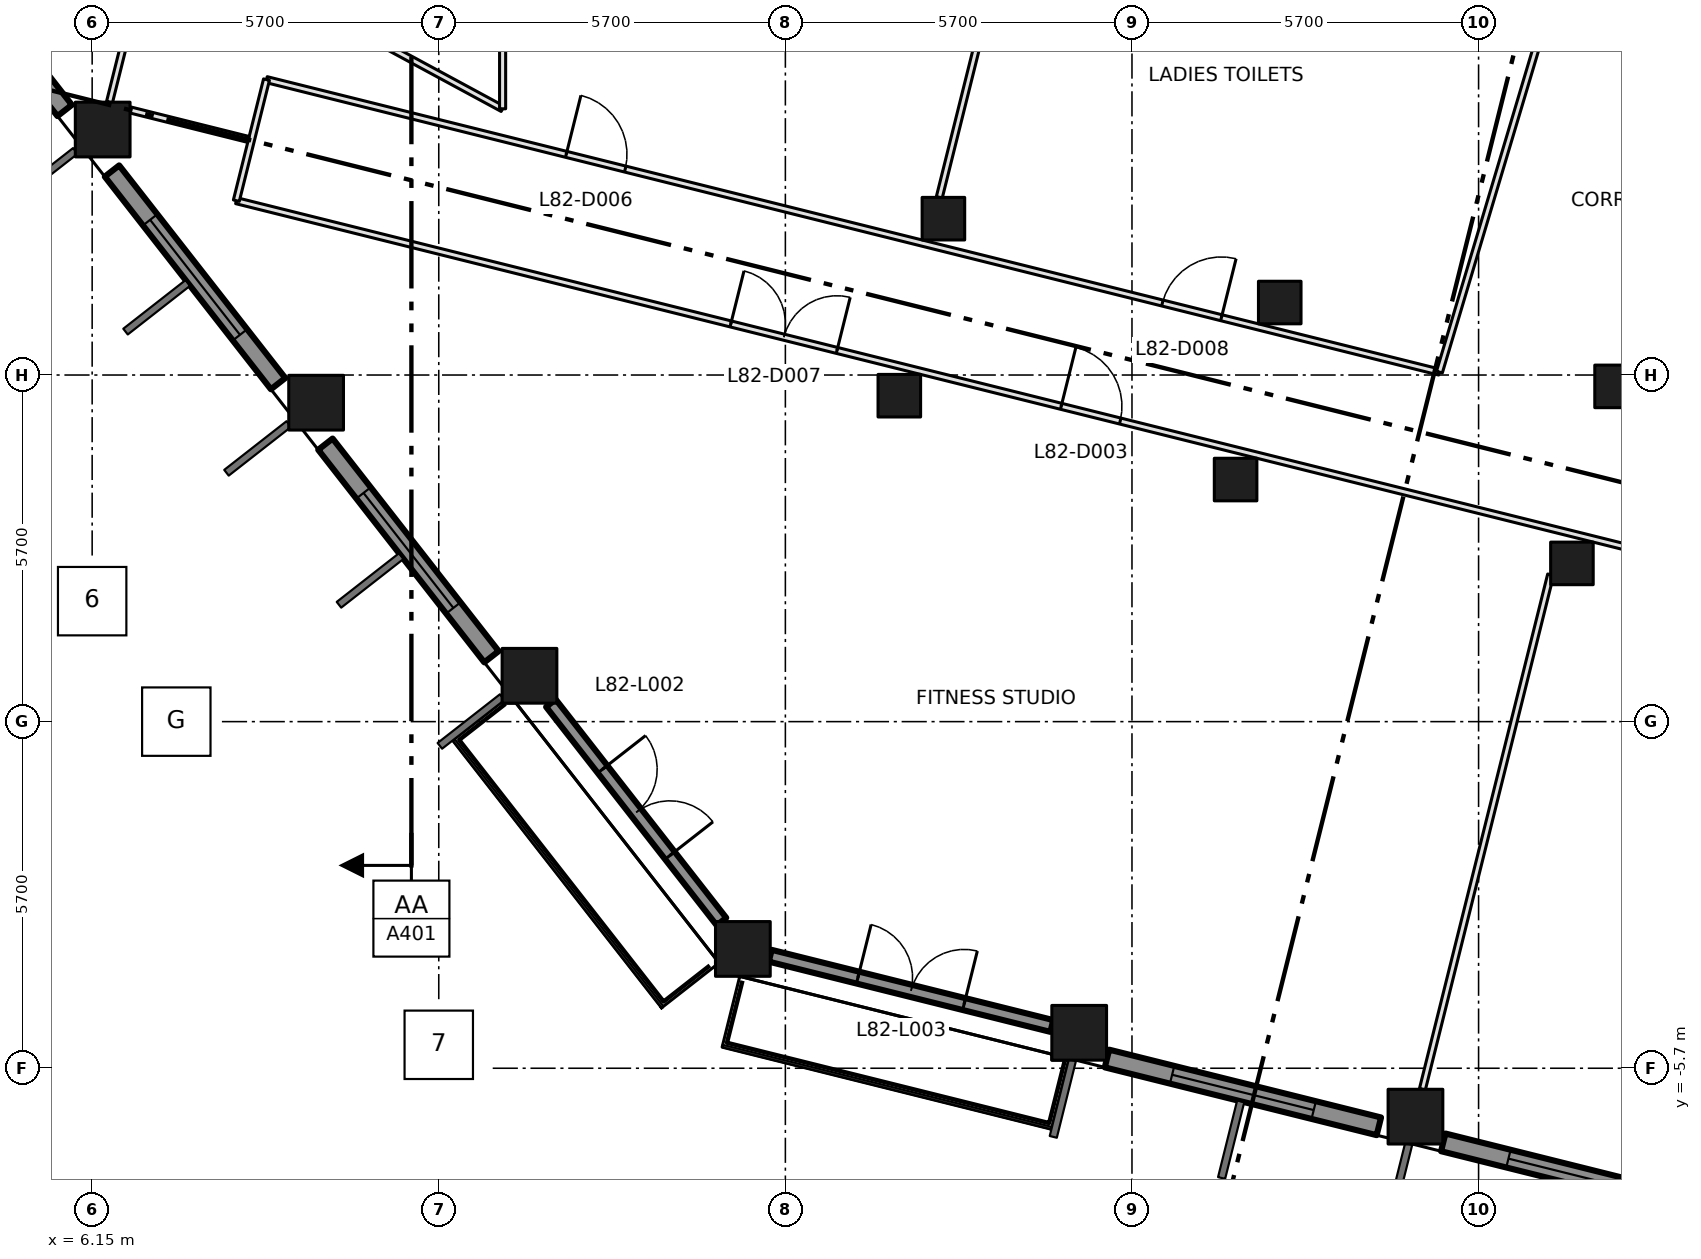
"""IFC4 building model, lengths in metres.
Left out: names, types, materials, properties, quantities, classifications, styles, units other than length and angle.
Written with IfcOpenShell. Run it as: python <this file> out.ifc"""

import sys

from ifc_helpers import new_model, si_unit, direction, frame, frame_2d, origin, origin_2d, place, context, subcontext, project, spatial, rectangle, extrude, element, fill, save


model = new_model("IFC4")
c1 = context("Model", 3, precision=1e-05, world=origin(), true_north=direction((0.0, 1.0)))
c2 = subcontext(c1, "Body", "Model", "MODEL_VIEW")
j1 = project(units=[si_unit("LENGTHUNIT", "METRE"), si_unit("PLANEANGLEUNIT", "RADIAN")], contexts=[c1])
p1 = place(None, origin())
s1 = spatial("IfcSite", under=j1, at=p1, CompositionType="ELEMENT")
p2 = place(p1, origin())
s2 = spatial("IfcBuilding", under=s1, at=p2, CompositionType="ELEMENT")
p3 = place(p2, frame((0.0, 0.0, 358.2)))
s3 = spatial("IfcBuildingStorey", under=s2, at=p3, CompositionType="ELEMENT", Elevation=358.2)
for number, where, z_axis, x_axis in (
    (1, (16.851, -3.738, 0.0), (0.0, 0.0, 1.0), (1.0, 0.0, 0.0)),
    (2, (13.342, 0.754, 0.0), (0.0, 0.0, 1.0), (1.0, 0.0, 0.0)),
    (3, (9.833, 5.245, 0.0), (0.0, 0.0, 1.0), (1.0, 0.0, 0.0)),
    (4, (6.323, 9.737, 0.0), (0.0, 0.0, 1.0), (1.0, 0.0, 0.0)),
    (5, (22.382, -5.117, 0.0), (0.0, 0.0, 1.0), (1.0, 0.0, 0.0)),
    (6, (27.912, -6.496, 0.0), (0.0, 0.0, 1.0), (1.0, 0.0, 0.0)),
):
    element("IfcColumn", number, at=place(p3, frame(where, z_axis=z_axis, x_axis=x_axis)), inside=s3, PredefinedType="COLUMN", context=c2, shape_type="SweptSolid", body=[
        extrude(rectangle(XDim=0.9, YDim=0.9, at=origin_2d()), origin(), (0.0, 0.0, 1.0), 4.2),
    ])
for number, where, z_axis, x_axis in (
    (7, (19.424, 5.36, 0.0), (0.0, 0.0, 1.0), (1.0, 0.0, 0.0)),
    (8, (24.954, 3.981, 0.0), (0.0, 0.0, 1.0), (1.0, 0.0, 0.0)),
    (9, (30.485, 2.602, 0.0), (0.0, 0.0, 1.0), (1.0, 0.0, 0.0)),
    (10, (20.149, 8.271, 0.0), (0.0, 0.0, 1.0), (1.0, 0.0, 0.0)),
    (11, (25.68, 6.892, 0.0), (0.0, 0.0, 1.0), (1.0, 0.0, 0.0)),
    (12, (31.211, 5.513, 0.0), (0.0, 0.0, 1.0), (1.0, 0.0, 0.0)),
):
    element("IfcColumn", number, at=place(p3, frame(where, z_axis=z_axis, x_axis=x_axis)), inside=s3, PredefinedType="COLUMN", context=c2, shape_type="SweptSolid", body=[
        extrude(rectangle(XDim=0.7, YDim=0.7, at=origin_2d()), origin(), (0.0, 0.0, 1.0), 4.2),
    ])
p4 = place(p3, frame((2.967, 13.547, 0.0), z_axis=(0.0, 0.0, 1.0), x_axis=(0.615486001463, -0.788147817356, 0.0)))
e13 = element("IfcWall", 13, at=p4, inside=s3, PredefinedType="SOLIDWALL", context=c2, shape_type="SweptSolid", body=[
    extrude(rectangle(XDim=4.437, YDim=0.3, at=frame_2d((2.219, 0.0))), origin(), (0.0, 0.0, 1.0), 3.2),
])
p5 = place(p4, frame((1.018, 0.0, 0.8)))
e14 = element("IfcOpeningElement", 14, at=p5, cuts=e13, PredefinedType="OPENING", context=c2, shape_type="SweptSolid", body=[
    extrude(rectangle(XDim=2.4, YDim=2.1, at=frame_2d((1.2, 1.05))), frame((0.0, 0.16, 0.0), z_axis=(0.0, -1.0, 0.0), x_axis=(1.0, 0.0, 0.0)), (0.0, 0.0, 1.0), 0.32),
])
p6 = place(p3, frame((6.476, 9.055, 0.0), z_axis=(0.0, 0.0, 1.0), x_axis=(0.615649380255, -0.788020203162, 0.0)))
e15 = element("IfcWall", 15, at=p6, inside=s3, PredefinedType="SOLIDWALL", context=c2, shape_type="SweptSolid", body=[
    extrude(rectangle(XDim=4.438, YDim=0.3, at=frame_2d((2.219, 0.0))), origin(), (0.0, 0.0, 1.0), 3.2),
])
p7 = place(p6, frame((1.019, 0.0, 0.8)))
e16 = element("IfcOpeningElement", 16, at=p7, cuts=e15, PredefinedType="OPENING", context=c2, shape_type="SweptSolid", body=[
    extrude(rectangle(XDim=2.4, YDim=2.1, at=frame_2d((1.2, 1.05))), frame((0.0, 0.16, 0.0), z_axis=(0.0, -1.0, 0.0), x_axis=(1.0, 0.0, 0.0)), (0.0, 0.0, 1.0), 0.32),
])
p8 = place(p3, frame((9.986, 4.563, 0.0), z_axis=(0.0, 0.0, 1.0), x_axis=(0.615592779411, -0.788064419915, 0.0)))
e17 = element("IfcWall", 17, at=p8, inside=s3, PredefinedType="SOLIDWALL", context=c2, shape_type="SweptSolid", body=[
    extrude(rectangle(XDim=4.436, YDim=0.3, at=frame_2d((2.218, 0.0))), origin(), (0.0, 0.0, 1.0), 3.2),
])
p9 = place(p8, frame((1.018, 0.0, 0.8)))
e18 = element("IfcOpeningElement", 18, at=p9, cuts=e17, PredefinedType="OPENING", context=c2, shape_type="SweptSolid", body=[
    extrude(rectangle(XDim=2.4, YDim=2.1, at=frame_2d((1.2, 1.05))), frame((0.0, 0.16, 0.0), z_axis=(0.0, -1.0, 0.0), x_axis=(1.0, 0.0, 0.0)), (0.0, 0.0, 1.0), 0.32),
])
p10 = place(p3, frame((13.694, 0.304, 0.0), z_axis=(0.0, 0.0, 1.0), x_axis=(0.615460024179, -0.788168103033, 0.0)))
e19 = element("IfcWall", 19, at=p10, inside=s3, PredefinedType="SOLIDWALL", context=c2, shape_type="SweptSolid", body=[
    extrude(rectangle(XDim=4.557, YDim=0.2, at=frame_2d((2.279, 0.0))), origin(), (0.0, 0.0, 1.0), 3.2),
])
p11 = place(p10, frame((1.379, 0.0, 0.0)))
e20 = element("IfcOpeningElement", 20, at=p11, cuts=e19, PredefinedType="OPENING", context=c2, shape_type="SweptSolid", body=[
    extrude(rectangle(XDim=1.8, YDim=2.9, at=frame_2d((0.9, 1.45))), frame((0.0, 0.11, 0.0), z_axis=(0.0, -1.0, 0.0), x_axis=(1.0, 0.0, 0.0)), (0.0, 0.0, 1.0), 0.22),
])
p12 = place(p3, frame((12.398, -0.199, 0.0), z_axis=(0.0, 0.0, 1.0), x_axis=(0.615638738903, -0.788028516719, 0.0)))
e21 = element("IfcWall", 21, at=p12, inside=s3, PredefinedType="SOLIDWALL", context=c2, shape_type="SweptSolid", body=[
    extrude(rectangle(XDim=5.36, YDim=0.4, at=frame_2d((2.68, 0.0))), origin(), (0.0, 0.0, 1.0), 0.3),
])
p13 = place(p3, frame((17.301, -3.85, 0.0), z_axis=(0.0, 0.0, 1.0), x_axis=(0.970286762598, -0.241957844111, 0.0)))
e22 = element("IfcWall", 22, at=p13, inside=s3, PredefinedType="SOLIDWALL", context=c2, shape_type="SweptSolid", body=[
    extrude(rectangle(XDim=4.773, YDim=0.2, at=frame_2d((2.386, 0.0))), origin(), (0.0, 0.0, 1.0), 3.2),
])
p14 = place(p13, frame((1.486, 0.0, 0.0)))
e23 = element("IfcOpeningElement", 23, at=p14, cuts=e22, PredefinedType="OPENING", context=c2, shape_type="SweptSolid", body=[
    extrude(rectangle(XDim=1.8, YDim=2.9, at=frame_2d((0.9, 1.45))), frame((0.0, 0.11, 0.0), z_axis=(0.0, -1.0, 0.0), x_axis=(1.0, 0.0, 0.0)), (0.0, 0.0, 1.0), 0.22),
])
p15 = place(p3, frame((16.694, -5.069, 0.0), z_axis=(0.0, 0.0, 1.0), x_axis=(0.970289679319, -0.241946147329, 0.0)))
e24 = element("IfcWall", 24, at=p15, inside=s3, PredefinedType="SOLIDWALL", context=c2, shape_type="SweptSolid", body=[
    extrude(rectangle(XDim=5.36, YDim=0.4, at=frame_2d((2.68, 0.0))), origin(), (0.0, 0.0, 1.0), 0.3),
])
p16 = place(p3, frame((22.839, -5.54, 0.0), z_axis=(0.0, 0.0, 1.0), x_axis=(0.970282587769, -0.241974585177, 0.0)))
e25 = element("IfcWall", 25, at=p16, inside=s3, PredefinedType="SOLIDWALL", context=c2, shape_type="SweptSolid", body=[
    extrude(rectangle(XDim=4.608, YDim=0.3, at=frame_2d((2.304, 0.0))), origin(), (0.0, 0.0, 1.0), 3.2),
])
p17 = place(p16, frame((1.104, 0.0, 0.8)))
e26 = element("IfcOpeningElement", 26, at=p17, cuts=e25, PredefinedType="OPENING", context=c2, shape_type="SweptSolid", body=[
    extrude(rectangle(XDim=2.4, YDim=2.1, at=frame_2d((1.2, 1.05))), frame((0.0, 0.16, 0.0), z_axis=(0.0, -1.0, 0.0), x_axis=(1.0, 0.0, 0.0)), (0.0, 0.0, 1.0), 0.32),
])
p18 = place(p3, frame((28.369, -6.919, 0.0), z_axis=(0.0, 0.0, 1.0), x_axis=(0.970298093093, -0.241912402618, 0.0)))
e27 = element("IfcWall", 27, at=p18, inside=s3, PredefinedType="SOLIDWALL", context=c2, shape_type="SweptSolid", body=[
    extrude(rectangle(XDim=4.609, YDim=0.3, at=frame_2d((2.305, 0.0))), origin(), (0.0, 0.0, 1.0), 3.2),
])
p19 = place(p18, frame((1.105, 0.0, 0.8)))
e28 = element("IfcOpeningElement", 28, at=p19, cuts=e27, PredefinedType="OPENING", context=c2, shape_type="SweptSolid", body=[
    extrude(rectangle(XDim=2.4, YDim=2.1, at=frame_2d((1.2, 1.05))), frame((0.0, 0.16, 0.0), z_axis=(0.0, -1.0, 0.0), x_axis=(1.0, 0.0, 0.0)), (0.0, 0.0, 1.0), 0.32),
])
p20 = place(p3, frame((8.521, 8.567, 0.0), z_axis=(0.0, 0.0, 1.0), x_axis=(0.970303035129, -0.241892579506, 0.0)))
e29 = element("IfcWall", 29, at=p20, inside=s3, PredefinedType="PARTITIONING", context=c2, shape_type="SweptSolid", body=[
    extrude(rectangle(XDim=28.5, YDim=0.1, at=frame_2d((14.25, 0.0))), origin(), (0.0, 0.0, 1.0), 3.9),
])
p21 = place(p20, frame((13.98, 0.0, 0.0)))
e30 = element("IfcOpeningElement", 30, at=p21, cuts=e29, PredefinedType="OPENING", context=c2, shape_type="SweptSolid", body=[
    extrude(rectangle(XDim=1.0, YDim=2.1, at=frame_2d((0.5, 1.05))), frame((0.0, 0.06, 0.0), z_axis=(0.0, -1.0, 0.0), x_axis=(1.0, 0.0, 0.0)), (0.0, 0.0, 1.0), 0.12),
])
p22 = place(p20, frame((8.38, 0.0, 0.0)))
e31 = element("IfcOpeningElement", 31, at=p22, cuts=e29, PredefinedType="OPENING", context=c2, shape_type="SweptSolid", body=[
    extrude(rectangle(XDim=1.8, YDim=2.1, at=frame_2d((0.9, 1.05))), frame((0.0, 0.06, 0.0), z_axis=(0.0, -1.0, 0.0), x_axis=(1.0, 0.0, 0.0)), (0.0, 0.0, 1.0), 0.12),
])
p23 = place(p3, frame((9.017, 10.558, 0.0), z_axis=(0.0, 0.0, 1.0), x_axis=(0.970286089829, -0.241960542, 0.0)))
e32 = element("IfcWall", 32, at=p23, inside=s3, PredefinedType="PARTITIONING", context=c2, shape_type="SweptSolid", body=[
    extrude(rectangle(XDim=19.879, YDim=0.1, at=frame_2d((9.94, 0.0))), origin(), (0.0, 0.0, 1.0), 3.9),
])
p24 = place(p23, frame((5.08, 0.0, 0.0)))
e33 = element("IfcOpeningElement", 33, at=p24, cuts=e32, PredefinedType="OPENING", context=c2, shape_type="SweptSolid", body=[
    extrude(rectangle(XDim=1.0, YDim=2.1, at=frame_2d((0.5, 1.05))), frame((0.0, 0.06, 0.0), z_axis=(0.0, -1.0, 0.0), x_axis=(1.0, 0.0, 0.0)), (0.0, 0.0, 1.0), 0.12),
])
p25 = place(p23, frame((15.184, 0.0, 0.0)))
e34 = element("IfcOpeningElement", 34, at=p25, cuts=e32, PredefinedType="OPENING", context=c2, shape_type="SweptSolid", body=[
    extrude(rectangle(XDim=1.0, YDim=2.1, at=frame_2d((0.5, 1.05))), frame((0.0, 0.06, 0.0), z_axis=(0.0, -1.0, 0.0), x_axis=(1.0, 0.0, 0.0)), (0.0, 0.0, 1.0), 0.12),
])
p26 = place(p3, frame((9.017, 10.558, 0.0), z_axis=(0.0, 0.0, 1.0), x_axis=(-0.241751728323, -0.970338137895, 0.0)))
e35 = element("IfcWall", 35, at=p26, inside=s3, PredefinedType="PARTITIONING", context=c2, shape_type="SweptSolid", body=[
    extrude(rectangle(XDim=2.052, YDim=0.1, at=frame_2d((1.026, 0.0))), origin(), (0.0, 0.0, 1.0), 3.9),
])
p27 = place(p3, frame((9.9, 11.7, 0.0), z_axis=(0.0, 0.0, 1.0), x_axis=(0.87965147249, -0.475618846291, 0.0)))
e36 = element("IfcWall", 36, at=p27, inside=s3, PredefinedType="PARTITIONING", context=c2, shape_type="SweptSolid", body=[
    extrude(rectangle(XDim=3.41, YDim=0.1, at=frame_2d((1.705, 0.0))), origin(), (0.0, 0.0, 1.0), 3.9),
])
p28 = place(p3, frame((12.9, 10.078, 0.0), z_axis=(0.0, 0.0, 1.0), x_axis=(0.0, 1.0, 0.0)))
e37 = element("IfcWall", 37, at=p28, inside=s3, PredefinedType="PARTITIONING", context=c2, shape_type="SweptSolid", body=[
    extrude(rectangle(XDim=4.022, YDim=0.1, at=frame_2d((2.011, 0.0))), origin(), (0.0, 0.0, 1.0), 3.9),
])
p29 = place(p3, frame((30.8, 14.1, 0.0), z_axis=(0.0, 0.0, 1.0), x_axis=(-0.286139929679, -0.958187842045, 0.0)))
e38 = element("IfcWall", 38, at=p29, inside=s3, PredefinedType="PARTITIONING", context=c2, shape_type="SweptSolid", body=[
    extrude(rectangle(XDim=8.717, YDim=0.1, at=frame_2d((4.358, 0.0))), origin(), (0.0, 0.0, 1.0), 3.9),
])
p30 = place(p3, frame((6.797, 11.638, 0.0), z_axis=(0.0, 0.0, 1.0), x_axis=(-0.242113049408, -0.970248046278, 0.0)))
e39 = element("IfcWall", 39, at=p30, inside=s3, PredefinedType="PARTITIONING", context=c2, shape_type="SweptSolid", body=[
    extrude(rectangle(XDim=1.495, YDim=0.1, at=frame_2d((0.748, 0.0))), origin(), (0.0, 0.0, 1.0), 3.9),
])
p31 = place(p3, frame((8.72, 9.574, 0.0), z_axis=(0.0, 0.0, 1.0), x_axis=(-0.970221168815, 0.24222073318, 0.0)))
e40 = element("IfcWall", 40, at=p31, inside=s3, PredefinedType="PARTITIONING", context=c2, shape_type="SweptSolid", body=[
    extrude(rectangle(XDim=2.007, YDim=0.1, at=frame_2d((1.003, 0.0))), origin(), (0.0, 0.0, 1.0), 3.9),
])
p32 = place(p3, frame((20.081, 8.621, 0.0), z_axis=(0.0, 0.0, 1.0), x_axis=(0.241904838353, 0.970299978966, 0.0)))
e41 = element("IfcWall", 41, at=p32, inside=s3, PredefinedType="PARTITIONING", context=c2, shape_type="SweptSolid", body=[
    extrude(rectangle(XDim=5.647, YDim=0.1, at=frame_2d((2.823, 0.0))), origin(), (0.0, 0.0, 1.0), 3.9),
])
p33 = place(p3, frame((28.026, -6.046, 0.0), z_axis=(0.0, 0.0, 1.0), x_axis=(0.241850505633, 0.970313523004, 0.0)))
e42 = element("IfcWall", 42, at=p33, inside=s3, PredefinedType="PARTITIONING", context=c2, shape_type="SweptSolid", body=[
    extrude(rectangle(XDim=8.721, YDim=0.1, at=frame_2d((4.36, 0.0))), origin(), (0.0, 0.0, 1.0), 3.9),
])
p34 = place(p7, origin())
e43 = element("IfcWindow", 43, at=p34, inside=s3, PartitioningType="DOUBLE_PANEL_VERTICAL", PredefinedType="WINDOW", context=c2, shape_type="SweptSolid", body=[
    extrude(rectangle(XDim=2.4, YDim=2.1, at=frame_2d((1.2, 1.05))), frame((0.0, 0.03, 0.0), z_axis=(0.0, -1.0, 0.0), x_axis=(1.0, 0.0, 0.0)), (0.0, 0.0, 1.0), 0.06),
])
fill(e16, e43)
p35 = place(p9, origin())
e44 = element("IfcWindow", 44, at=p35, inside=s3, PartitioningType="DOUBLE_PANEL_VERTICAL", PredefinedType="WINDOW", context=c2, shape_type="SweptSolid", body=[
    extrude(rectangle(XDim=2.4, YDim=2.1, at=frame_2d((1.2, 1.05))), frame((0.0, 0.03, 0.0), z_axis=(0.0, -1.0, 0.0), x_axis=(1.0, 0.0, 0.0)), (0.0, 0.0, 1.0), 0.06),
])
fill(e18, e44)
p36 = place(p11, origin())
e45 = element("IfcDoor", 45, at=p36, inside=s3, OperationType="DOUBLE_DOOR_SINGLE_SWING", PredefinedType="DOOR", context=c2, shape_type="SweptSolid", body=[
    extrude(rectangle(XDim=1.8, YDim=2.9, at=frame_2d((0.9, 1.45))), frame((0.0, 0.025, 0.0), z_axis=(0.0, -1.0, 0.0), x_axis=(1.0, 0.0, 0.0)), (0.0, 0.0, 1.0), 0.05),
])
fill(e20, e45)
p37 = place(p14, origin())
e46 = element("IfcDoor", 46, at=p37, inside=s3, OperationType="DOUBLE_DOOR_SINGLE_SWING", PredefinedType="DOOR", context=c2, shape_type="SweptSolid", body=[
    extrude(rectangle(XDim=1.8, YDim=2.9, at=frame_2d((0.9, 1.45))), frame((0.0, 0.025, 0.0), z_axis=(0.0, -1.0, 0.0), x_axis=(1.0, 0.0, 0.0)), (0.0, 0.0, 1.0), 0.05),
])
fill(e23, e46)
p38 = place(p17, origin())
e47 = element("IfcWindow", 47, at=p38, inside=s3, PartitioningType="DOUBLE_PANEL_VERTICAL", PredefinedType="WINDOW", context=c2, shape_type="SweptSolid", body=[
    extrude(rectangle(XDim=2.4, YDim=2.1, at=frame_2d((1.2, 1.05))), frame((0.0, 0.03, 0.0), z_axis=(0.0, -1.0, 0.0), x_axis=(1.0, 0.0, 0.0)), (0.0, 0.0, 1.0), 0.06),
])
fill(e26, e47)
p39 = place(p19, origin())
e48 = element("IfcWindow", 48, at=p39, inside=s3, PartitioningType="DOUBLE_PANEL_VERTICAL", PredefinedType="WINDOW", context=c2, shape_type="SweptSolid", body=[
    extrude(rectangle(XDim=2.4, YDim=2.1, at=frame_2d((1.2, 1.05))), frame((0.0, 0.03, 0.0), z_axis=(0.0, -1.0, 0.0), x_axis=(1.0, 0.0, 0.0)), (0.0, 0.0, 1.0), 0.06),
])
fill(e28, e48)
p40 = place(p21, origin())
e49 = element("IfcDoor", 49, at=p40, inside=s3, OperationType="SINGLE_SWING_LEFT", PredefinedType="DOOR", context=c2, shape_type="SweptSolid", body=[
    extrude(rectangle(XDim=1.0, YDim=2.1, at=frame_2d((0.5, 1.05))), frame((0.0, 0.025, 0.0), z_axis=(0.0, -1.0, 0.0), x_axis=(1.0, 0.0, 0.0)), (0.0, 0.0, 1.0), 0.05),
])
fill(e30, e49)
p41 = place(p24, origin())
e50 = element("IfcDoor", 50, at=p41, inside=s3, OperationType="SINGLE_SWING_LEFT", PredefinedType="DOOR", context=c2, shape_type="SweptSolid", body=[
    extrude(rectangle(XDim=1.0, YDim=2.1, at=frame_2d((0.5, 1.05))), frame((0.0, 0.025, 0.0), z_axis=(0.0, -1.0, 0.0), x_axis=(1.0, 0.0, 0.0)), (0.0, 0.0, 1.0), 0.05),
])
fill(e33, e50)
p42 = place(p22, origin())
e51 = element("IfcDoor", 51, at=p42, inside=s3, OperationType="DOUBLE_DOOR_SINGLE_SWING", PredefinedType="DOOR", context=c2, shape_type="SweptSolid", body=[
    extrude(rectangle(XDim=1.8, YDim=2.1, at=frame_2d((0.9, 1.05))), frame((0.0, 0.025, 0.0), z_axis=(0.0, -1.0, 0.0), x_axis=(1.0, 0.0, 0.0)), (0.0, 0.0, 1.0), 0.05),
])
fill(e31, e51)
p43 = place(p25, origin())
e52 = element("IfcDoor", 52, at=p43, inside=s3, OperationType="SINGLE_SWING_RIGHT", PredefinedType="DOOR", context=c2, shape_type="SweptSolid", body=[
    extrude(rectangle(XDim=1.0, YDim=2.1, at=frame_2d((0.5, 1.05))), frame((0.0, 0.025, 0.0), z_axis=(0.0, -1.0, 0.0), x_axis=(1.0, 0.0, 0.0)), (0.0, 0.0, 1.0), 0.05),
])
fill(e34, e52)
save(model, sys.argv[1])
